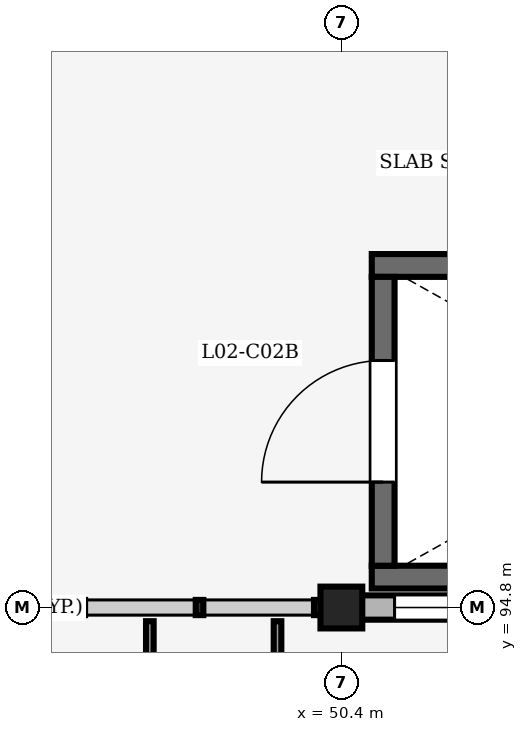
"""IFC4 building model, lengths in metres.
Left out: names, types, materials, properties, quantities, classifications, styles, units other than length and angle.
Written with IfcOpenShell. Run it as: python <this file> out.ifc"""

import sys

from ifc_helpers import new_model, si_unit, direction, frame, frame_2d, origin, origin_2d, place, context, subcontext, project, spatial, rectangle, extrude, element, fill, save


model = new_model("IFC4")
c1 = context("Model", 3, precision=1e-05, world=origin(), true_north=direction((0.0, 1.0)))
c2 = subcontext(c1, "Body", "Model", "MODEL_VIEW")
j1 = project(units=[si_unit("LENGTHUNIT", "METRE"), si_unit("PLANEANGLEUNIT", "RADIAN")], contexts=[c1])
p1 = place(None, origin())
s1 = spatial("IfcSite", under=j1, at=p1, CompositionType="ELEMENT")
p2 = place(p1, origin())
s2 = spatial("IfcBuilding", under=s1, at=p2, CompositionType="ELEMENT")
p3 = place(p2, frame((0.0, 0.0, 9.0)))
s3 = spatial("IfcBuildingStorey", under=s2, at=p3, CompositionType="ELEMENT", Elevation=9.0)
p4 = place(p3, frame((50.4, 94.8, 0.0), z_axis=(0.0, 0.0, 1.0), x_axis=(1.0, 0.0, 0.0)))
e1 = element("IfcColumn", 1, at=p4, inside=s3, PredefinedType="COLUMN", context=c2, shape_type="SweptSolid", body=[
    extrude(rectangle(XDim=0.55, YDim=0.55, at=origin_2d()), origin(), (0.0, 0.0, 1.0), 4.2),
])
p5 = place(p3, frame((50.65, 94.8, 0.0), z_axis=(0.0, 0.0, 1.0), x_axis=(1.0, 0.0, 0.0)))
e2 = element("IfcWall", 2, at=p5, inside=s3, PredefinedType="SOLIDWALL", context=c2, shape_type="SweptSolid", body=[
    extrude(rectangle(XDim=7.9, YDim=0.32, at=frame_2d((3.95, 0.0))), origin(), (0.0, 0.0, 1.0), 3.36),
])
p6 = place(p5, frame((0.45, 0.0, 0.9)))
e3 = element("IfcOpeningElement", 3, at=p6, cuts=e2, PredefinedType="OPENING", context=c2, shape_type="SweptSolid", body=[
    extrude(rectangle(XDim=1.2, YDim=1.5, at=frame_2d((0.6, 0.75))), frame((0.0, 0.17, 0.0), z_axis=(0.0, -1.0, 0.0), x_axis=(1.0, 0.0, 0.0)), (0.0, 0.0, 1.0), 0.34),
])
p7 = place(p5, frame((6.25, 0.0, 0.9)))
e4 = element("IfcOpeningElement", 4, at=p7, cuts=e2, PredefinedType="OPENING", context=c2, shape_type="SweptSolid", body=[
    extrude(rectangle(XDim=1.2, YDim=1.8, at=frame_2d((0.6, 0.9))), frame((0.0, 0.17, 0.0), z_axis=(0.0, -1.0, 0.0), x_axis=(1.0, 0.0, 0.0)), (0.0, 0.0, 1.0), 0.34),
])
for number, where, z_axis, x_axis in (
    (5, (50.8, 95.2, 0.0), (0.0, 0.0, 1.0), (1.0, 0.0, 0.0)),
    (6, (50.8, 99.3, 0.0), (0.0, 0.0, 1.0), (1.0, 0.0, 0.0)),
):
    element("IfcWall", number, at=place(p3, frame(where, z_axis=z_axis, x_axis=x_axis)), inside=s3, PredefinedType="SHEAR", context=c2, shape_type="SweptSolid", body=[
        extrude(rectangle(XDim=7.6, YDim=0.3, at=frame_2d((3.8, 0.0))), origin(), (0.0, 0.0, 1.0), 4.025),
    ])
p8 = place(p3, frame((50.95, 95.35, 0.0), z_axis=(0.0, 0.0, 1.0), x_axis=(0.0, 1.0, 0.0)))
e7 = element("IfcWall", 7, at=p8, inside=s3, PredefinedType="SHEAR", context=c2, shape_type="SweptSolid", body=[
    extrude(rectangle(XDim=3.8, YDim=0.3, at=frame_2d((1.9, 0.0))), origin(), (0.0, 0.0, 1.0), 4.025),
])
p9 = place(p8, frame((1.1, 0.0, 0.0)))
e8 = element("IfcOpeningElement", 8, at=p9, cuts=e7, PredefinedType="OPENING", context=c2, shape_type="SweptSolid", body=[
    extrude(rectangle(XDim=1.6, YDim=2.2, at=frame_2d((0.8, 1.1))), frame((0.0, 0.16, 0.0), z_axis=(0.0, -1.0, 0.0), x_axis=(1.0, 0.0, 0.0)), (0.0, 0.0, 1.0), 0.32),
])
p10 = place(p6, origin())
e9 = element("IfcWindow", 9, at=p10, inside=s3, PartitioningType="SINGLE_PANEL", PredefinedType="WINDOW", context=c2, shape_type="SweptSolid", body=[
    extrude(rectangle(XDim=1.2, YDim=1.5, at=frame_2d((0.6, 0.75))), frame((0.0, 0.03, 0.0), z_axis=(0.0, -1.0, 0.0), x_axis=(1.0, 0.0, 0.0)), (0.0, 0.0, 1.0), 0.06),
])
fill(e3, e9)
p11 = place(p9, origin())
e10 = element("IfcDoor", 10, at=p11, inside=s3, OperationType="DOUBLE_DOOR_SINGLE_SWING", PredefinedType="DOOR", context=c2, shape_type="SweptSolid", body=[
    extrude(rectangle(XDim=1.6, YDim=2.2, at=frame_2d((0.8, 1.1))), frame((0.0, 0.025, 0.0), z_axis=(0.0, -1.0, 0.0), x_axis=(1.0, 0.0, 0.0)), (0.0, 0.0, 1.0), 0.05),
])
fill(e8, e10)
save(model, sys.argv[1])
